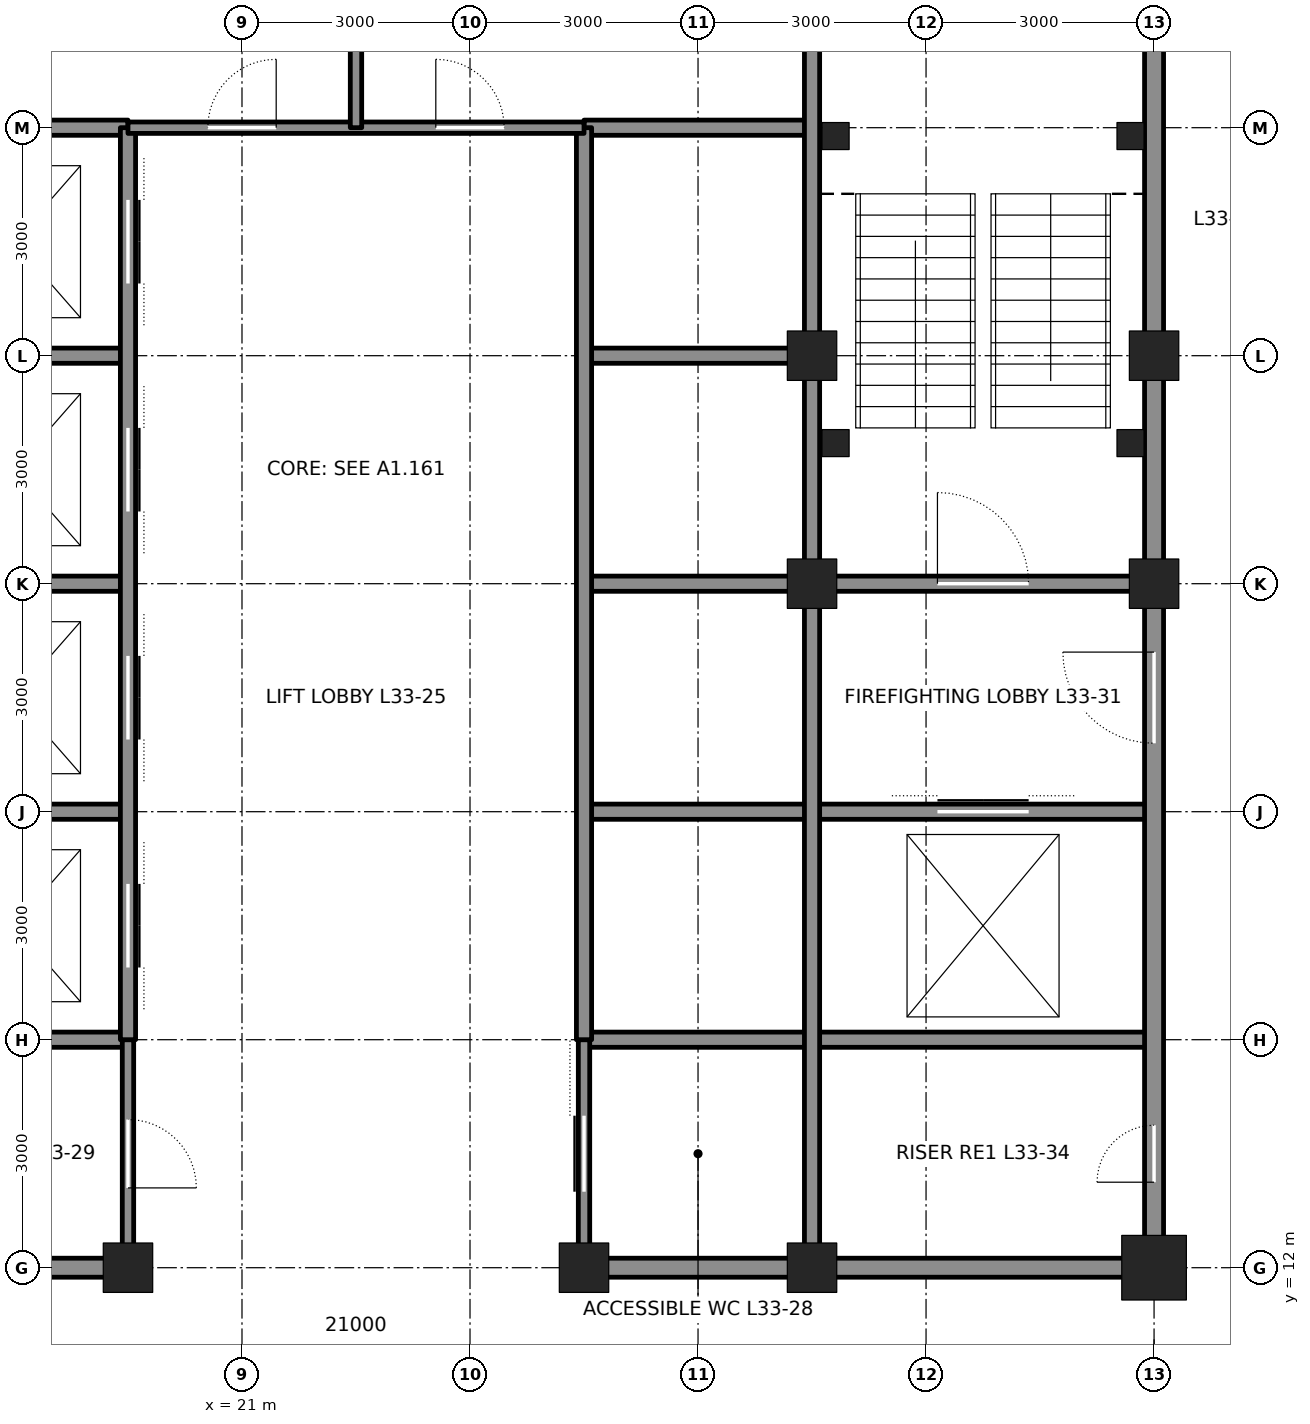
"""IFC4 building model, lengths in metres.
Left out: names, types, materials, properties, quantities, classifications, styles, units other than length and angle.
Written with IfcOpenShell. Run it as: python <this file> out.ifc"""

import sys

from ifc_helpers import new_model, si_unit, direction, frame, frame_2d, origin, origin_2d, place, context, subcontext, project, spatial, rectangle, hollow_rectangle, extrude, element, fill, save


model = new_model("IFC4")
c1 = context("Model", 3, precision=1e-05, world=origin(), true_north=direction((0.0, 1.0)))
c2 = subcontext(c1, "Body", "Model", "MODEL_VIEW")
j1 = project(units=[si_unit("LENGTHUNIT", "METRE"), si_unit("PLANEANGLEUNIT", "RADIAN")], contexts=[c1])
p1 = place(None, origin())
s1 = spatial("IfcSite", under=j1, at=p1, CompositionType="ELEMENT")
p2 = place(p1, origin())
s2 = spatial("IfcBuilding", under=s1, at=p2, CompositionType="ELEMENT")
p3 = place(p2, frame((0.0, 0.0, 153.0)))
s3 = spatial("IfcBuildingStorey", under=s2, at=p3, CompositionType="ELEMENT", Elevation=153.0)
for number, where, z_axis, x_axis in (
    (1, (19.5, 12.0, 0.0), (0.0, 0.0, 1.0), (1.0, 0.0, 0.0)),
    (2, (25.5, 12.0, 0.0), (0.0, 0.0, 1.0), (1.0, 0.0, 0.0)),
    (3, (28.5, 12.0, 0.0), (0.0, 0.0, 1.0), (1.0, 0.0, 0.0)),
):
    element("IfcColumn", number, at=place(p3, frame(where, z_axis=z_axis, x_axis=x_axis)), inside=s3, PredefinedType="COLUMN", context=c2, shape_type="SweptSolid", body=[
        extrude(hollow_rectangle(XDim=0.65, YDim=0.65, WallThickness=0.065, at=origin_2d()), origin(), (0.0, 0.0, 1.0), 4.2),
    ])
p4 = place(p3, frame((33.0, 12.0, 0.0), z_axis=(0.0, 0.0, 1.0), x_axis=(1.0, 0.0, 0.0)))
e4 = element("IfcColumn", 4, at=p4, inside=s3, PredefinedType="COLUMN", context=c2, shape_type="SweptSolid", body=[
    extrude(hollow_rectangle(XDim=0.85, YDim=0.85, WallThickness=0.085, at=origin_2d()), origin(), (0.0, 0.0, 1.0), 4.2),
])
for number, where, z_axis, x_axis in (
    (5, (33.0, 21.0, 0.0), (0.0, 0.0, 1.0), (1.0, 0.0, 0.0)),
    (6, (33.0, 24.0, 0.0), (0.0, 0.0, 1.0), (1.0, 0.0, 0.0)),
    (7, (28.5, 21.0, 0.0), (0.0, 0.0, 1.0), (1.0, 0.0, 0.0)),
    (8, (28.5, 24.0, 0.0), (0.0, 0.0, 1.0), (1.0, 0.0, 0.0)),
):
    element("IfcColumn", number, at=place(p3, frame(where, z_axis=z_axis, x_axis=x_axis)), inside=s3, PredefinedType="COLUMN", context=c2, shape_type="SweptSolid", body=[
        extrude(hollow_rectangle(XDim=0.65, YDim=0.65, WallThickness=0.065, at=origin_2d()), origin(), (0.0, 0.0, 1.0), 4.2),
    ])
for number, where, z_axis, x_axis in (
    (9, (16.75, 12.0, 0.0), (0.0, 0.0, 1.0), (1.0, 0.0, 0.0)),
    (10, (25.75, 12.0, 0.0), (0.0, 0.0, 1.0), (1.0, 0.0, 0.0)),
):
    element("IfcWall", number, at=place(p3, frame(where, z_axis=z_axis, x_axis=x_axis)), inside=s3, PredefinedType="SOLIDWALL", context=c2, shape_type="SweptSolid", body=[
        extrude(rectangle(XDim=2.5, YDim=0.25, at=frame_2d((1.25, 0.0))), origin(), (0.0, 0.0, 1.0), 3.181),
    ])
p5 = place(p3, frame((28.75, 12.0, 0.0), z_axis=(0.0, 0.0, 1.0), x_axis=(1.0, 0.0, 0.0)))
e11 = element("IfcWall", 11, at=p5, inside=s3, PredefinedType="SOLIDWALL", context=c2, shape_type="SweptSolid", body=[
    extrude(rectangle(XDim=4.0, YDim=0.25, at=frame_2d((2.0, 0.0))), origin(), (0.0, 0.0, 1.0), 3.181),
])
for number, where, z_axis, x_axis in (
    (12, (12.0, 15.0, 0.0), (0.0, 0.0, 1.0), (1.0, 0.0, 0.0)),
    (13, (25.5, 15.0, 0.0), (0.0, 0.0, 1.0), (1.0, 0.0, 0.0)),
):
    element("IfcWall", number, at=place(p3, frame(where, z_axis=z_axis, x_axis=x_axis)), inside=s3, PredefinedType="SOLIDWALL", context=c2, shape_type="SweptSolid", body=[
        extrude(rectangle(XDim=7.5, YDim=0.2, at=frame_2d((3.75, 0.0))), origin(), (0.0, 0.0, 1.0), 4.04),
    ])
for number, where, z_axis, x_axis in (
    (14, (16.75, 24.0, 0.0), (0.0, 0.0, 1.0), (1.0, 0.0, 0.0)),
    (15, (25.5, 24.0, 0.0), (0.0, 0.0, 1.0), (1.0, 0.0, 0.0)),
):
    element("IfcWall", number, at=place(p3, frame(where, z_axis=z_axis, x_axis=x_axis)), inside=s3, PredefinedType="SOLIDWALL", context=c2, shape_type="SweptSolid", body=[
        extrude(rectangle(XDim=2.75, YDim=0.2, at=frame_2d((1.375, 0.0))), origin(), (0.0, 0.0, 1.0), 3.09),
    ])
p6 = place(p3, frame((12.0, 27.0, 0.0), z_axis=(0.0, 0.0, 1.0), x_axis=(1.0, 0.0, 0.0)))
e16 = element("IfcWall", 16, at=p6, inside=s3, PredefinedType="SOLIDWALL", context=c2, shape_type="SweptSolid", body=[
    extrude(rectangle(XDim=7.5, YDim=0.2, at=frame_2d((3.75, 0.0))), origin(), (0.0, 0.0, 1.0), 4.04),
])
p7 = place(p6, frame((1.65, 0.0, 0.0)))
e17 = element("IfcOpeningElement", 17, at=p7, cuts=e16, PredefinedType="OPENING", context=c2, shape_type="SweptSolid", body=[
    extrude(rectangle(XDim=1.2, YDim=2.1, at=frame_2d((0.6, 1.05))), frame((0.0, 0.11, 0.0), z_axis=(0.0, -1.0, 0.0), x_axis=(1.0, 0.0, 0.0)), (0.0, 0.0, 1.0), 0.22),
])
for number, where, z_axis, x_axis in (
    (18, (25.5, 27.0, 0.0), (0.0, 0.0, 1.0), (1.0, 0.0, 0.0)),
    (19, (16.5, 18.0, 0.0), (0.0, 0.0, 1.0), (1.0, 0.0, 0.0)),
):
    element("IfcWall", number, at=place(p3, frame(where, z_axis=z_axis, x_axis=x_axis)), inside=s3, PredefinedType="SOLIDWALL", context=c2, shape_type="SweptSolid", body=[
        extrude(rectangle(XDim=3.0, YDim=0.2, at=frame_2d((1.5, 0.0))), origin(), (0.0, 0.0, 1.0), 4.04),
    ])
p8 = place(p3, frame((25.5, 18.0, 0.0), z_axis=(0.0, 0.0, 1.0), x_axis=(1.0, 0.0, 0.0)))
e20 = element("IfcWall", 20, at=p8, inside=s3, PredefinedType="SOLIDWALL", context=c2, shape_type="SweptSolid", body=[
    extrude(rectangle(XDim=7.5, YDim=0.2, at=frame_2d((3.75, 0.0))), origin(), (0.0, 0.0, 1.0), 4.04),
])
p9 = place(p8, frame((4.65, 0.0, 0.0)))
e21 = element("IfcOpeningElement", 21, at=p9, cuts=e20, PredefinedType="OPENING", context=c2, shape_type="SweptSolid", body=[
    extrude(rectangle(XDim=1.2, YDim=2.1, at=frame_2d((0.6, 1.05))), frame((0.0, 0.11, 0.0), z_axis=(0.0, -1.0, 0.0), x_axis=(1.0, 0.0, 0.0)), (0.0, 0.0, 1.0), 0.22),
])
for number, where, z_axis, x_axis in (
    (22, (16.75, 21.0, 0.0), (0.0, 0.0, 1.0), (1.0, 0.0, 0.0)),
    (23, (25.5, 21.0, 0.0), (0.0, 0.0, 1.0), (1.0, 0.0, 0.0)),
):
    element("IfcWall", number, at=place(p3, frame(where, z_axis=z_axis, x_axis=x_axis)), inside=s3, PredefinedType="SOLIDWALL", context=c2, shape_type="SweptSolid", body=[
        extrude(rectangle(XDim=2.75, YDim=0.2, at=frame_2d((1.375, 0.0))), origin(), (0.0, 0.0, 1.0), 3.09),
    ])
p10 = place(p3, frame((28.75, 21.0, 0.0), z_axis=(0.0, 0.0, 1.0), x_axis=(1.0, 0.0, 0.0)))
e24 = element("IfcWall", 24, at=p10, inside=s3, PredefinedType="SOLIDWALL", context=c2, shape_type="SweptSolid", body=[
    extrude(rectangle(XDim=4.0, YDim=0.2, at=frame_2d((2.0, 0.0))), origin(), (0.0, 0.0, 1.0), 3.09),
])
p11 = place(p10, frame((1.4, 0.0, 0.0)))
e25 = element("IfcOpeningElement", 25, at=p11, cuts=e24, PredefinedType="OPENING", context=c2, shape_type="SweptSolid", body=[
    extrude(rectangle(XDim=1.2, YDim=2.1, at=frame_2d((0.6, 1.05))), frame((0.0, 0.11, 0.0), z_axis=(0.0, -1.0, 0.0), x_axis=(1.0, 0.0, 0.0)), (0.0, 0.0, 1.0), 0.22),
])
p12 = place(p3, frame((19.5, 12.25, 0.0), z_axis=(0.0, 0.0, 1.0), x_axis=(0.0, 1.0, 0.0)))
e26 = element("IfcWall", 26, at=p12, inside=s3, PredefinedType="PARTITIONING", context=c2, shape_type="SweptSolid", body=[
    extrude(rectangle(XDim=2.75, YDim=0.15, at=frame_2d((1.375, 0.0))), origin(), (0.0, 0.0, 1.0), 3.065),
])
p13 = place(p12, frame((0.8, 0.0, 0.0)))
e27 = element("IfcOpeningElement", 27, at=p13, cuts=e26, PredefinedType="OPENING", context=c2, shape_type="SweptSolid", body=[
    extrude(rectangle(XDim=0.9, YDim=2.1, at=frame_2d((0.45, 1.05))), frame((0.0, 0.085, 0.0), z_axis=(0.0, -1.0, 0.0), x_axis=(1.0, 0.0, 0.0)), (0.0, 0.0, 1.0), 0.17),
])
p14 = place(p3, frame((19.5, 15.0, 0.0), z_axis=(0.0, 0.0, 1.0), x_axis=(0.0, 1.0, 0.0)))
e28 = element("IfcWall", 28, at=p14, inside=s3, PredefinedType="SOLIDWALL", context=c2, shape_type="SweptSolid", body=[
    extrude(rectangle(XDim=12.0, YDim=0.2, at=frame_2d((6.0, 0.0))), origin(), (0.0, 0.0, 1.0), 3.065),
])
p15 = place(p14, frame((0.95, 0.0, 0.0)))
e29 = element("IfcOpeningElement", 29, at=p15, cuts=e28, PredefinedType="OPENING", context=c2, shape_type="SweptSolid", body=[
    extrude(rectangle(XDim=1.1, YDim=2.1, at=frame_2d((0.55, 1.05))), frame((0.0, 0.11, 0.0), z_axis=(0.0, -1.0, 0.0), x_axis=(1.0, 0.0, 0.0)), (0.0, 0.0, 1.0), 0.22),
])
p16 = place(p14, frame((3.95, 0.0, 0.0)))
e30 = element("IfcOpeningElement", 30, at=p16, cuts=e28, PredefinedType="OPENING", context=c2, shape_type="SweptSolid", body=[
    extrude(rectangle(XDim=1.1, YDim=2.1, at=frame_2d((0.55, 1.05))), frame((0.0, 0.11, 0.0), z_axis=(0.0, -1.0, 0.0), x_axis=(1.0, 0.0, 0.0)), (0.0, 0.0, 1.0), 0.22),
])
p17 = place(p14, frame((6.95, 0.0, 0.0)))
e31 = element("IfcOpeningElement", 31, at=p17, cuts=e28, PredefinedType="OPENING", context=c2, shape_type="SweptSolid", body=[
    extrude(rectangle(XDim=1.1, YDim=2.1, at=frame_2d((0.55, 1.05))), frame((0.0, 0.11, 0.0), z_axis=(0.0, -1.0, 0.0), x_axis=(1.0, 0.0, 0.0)), (0.0, 0.0, 1.0), 0.22),
])
p18 = place(p14, frame((9.95, 0.0, 0.0)))
e32 = element("IfcOpeningElement", 32, at=p18, cuts=e28, PredefinedType="OPENING", context=c2, shape_type="SweptSolid", body=[
    extrude(rectangle(XDim=1.1, YDim=2.1, at=frame_2d((0.55, 1.05))), frame((0.0, 0.11, 0.0), z_axis=(0.0, -1.0, 0.0), x_axis=(1.0, 0.0, 0.0)), (0.0, 0.0, 1.0), 0.22),
])
p19 = place(p3, frame((25.5, 12.25, 0.0), z_axis=(0.0, 0.0, 1.0), x_axis=(0.0, 1.0, 0.0)))
e33 = element("IfcWall", 33, at=p19, inside=s3, PredefinedType="PARTITIONING", context=c2, shape_type="SweptSolid", body=[
    extrude(rectangle(XDim=2.75, YDim=0.15, at=frame_2d((1.375, 0.0))), origin(), (0.0, 0.0, 1.0), 3.065),
])
p20 = place(p19, frame((0.75, 0.0, 0.0)))
e34 = element("IfcOpeningElement", 34, at=p20, cuts=e33, PredefinedType="OPENING", context=c2, shape_type="SweptSolid", body=[
    extrude(rectangle(XDim=1.0, YDim=2.1, at=frame_2d((0.5, 1.05))), frame((0.0, 0.085, 0.0), z_axis=(0.0, -1.0, 0.0), x_axis=(1.0, 0.0, 0.0)), (0.0, 0.0, 1.0), 0.17),
])
p21 = place(p3, frame((25.5, 15.0, 0.0), z_axis=(0.0, 0.0, 1.0), x_axis=(0.0, 1.0, 0.0)))
e35 = element("IfcWall", 35, at=p21, inside=s3, PredefinedType="SOLIDWALL", context=c2, shape_type="SweptSolid", body=[
    extrude(rectangle(XDim=12.0, YDim=0.2, at=frame_2d((6.0, 0.0))), origin(), (0.0, 0.0, 1.0), 3.065),
])
p22 = place(p3, frame((28.5, 12.25, 0.0), z_axis=(0.0, 0.0, 1.0), x_axis=(0.0, 1.0, 0.0)))
e36 = element("IfcWall", 36, at=p22, inside=s3, PredefinedType="SOLIDWALL", context=c2, shape_type="SweptSolid", body=[
    extrude(rectangle(XDim=8.5, YDim=0.2, at=frame_2d((4.25, 0.0))), origin(), (0.0, 0.0, 1.0), 3.113),
])
p23 = place(p3, frame((28.5, 21.25, 0.0), z_axis=(0.0, 0.0, 1.0), x_axis=(0.0, 1.0, 0.0)))
e37 = element("IfcWall", 37, at=p23, inside=s3, PredefinedType="SOLIDWALL", context=c2, shape_type="SweptSolid", body=[
    extrude(rectangle(XDim=2.5, YDim=0.2, at=frame_2d((1.25, 0.0))), origin(), (0.0, 0.0, 1.0), 3.113),
])
p24 = place(p3, frame((28.5, 24.25, 0.0), z_axis=(0.0, 0.0, 1.0), x_axis=(0.0, 1.0, 0.0)))
e38 = element("IfcWall", 38, at=p24, inside=s3, PredefinedType="SOLIDWALL", context=c2, shape_type="SweptSolid", body=[
    extrude(rectangle(XDim=8.5, YDim=0.2, at=frame_2d((4.25, 0.0))), origin(), (0.0, 0.0, 1.0), 3.113),
])
p25 = place(p3, frame((33.0, 12.25, 0.0), z_axis=(0.0, 0.0, 1.0), x_axis=(0.0, 1.0, 0.0)))
e39 = element("IfcWall", 39, at=p25, inside=s3, PredefinedType="SOLIDWALL", context=c2, shape_type="SweptSolid", body=[
    extrude(rectangle(XDim=8.5, YDim=0.25, at=frame_2d((4.25, 0.0))), origin(), (0.0, 0.0, 1.0), 3.113),
])
p26 = place(p25, frame((6.65, 0.0, 0.0)))
e40 = element("IfcOpeningElement", 40, at=p26, cuts=e39, PredefinedType="OPENING", context=c2, shape_type="SweptSolid", body=[
    extrude(rectangle(XDim=1.2, YDim=2.1, at=frame_2d((0.6, 1.05))), frame((0.0, 0.135, 0.0), z_axis=(0.0, -1.0, 0.0), x_axis=(1.0, 0.0, 0.0)), (0.0, 0.0, 1.0), 0.27),
])
p27 = place(p25, frame((0.875, 0.0, 0.0)))
e41 = element("IfcOpeningElement", 41, at=p27, cuts=e39, PredefinedType="OPENING", context=c2, shape_type="SweptSolid", body=[
    extrude(rectangle(XDim=0.75, YDim=2.1, at=frame_2d((0.375, 1.05))), frame((0.0, 0.135, 0.0), z_axis=(0.0, -1.0, 0.0), x_axis=(1.0, 0.0, 0.0)), (0.0, 0.0, 1.0), 0.27),
])
p28 = place(p3, frame((33.0, 21.25, 0.0), z_axis=(0.0, 0.0, 1.0), x_axis=(0.0, 1.0, 0.0)))
e42 = element("IfcWall", 42, at=p28, inside=s3, PredefinedType="SOLIDWALL", context=c2, shape_type="SweptSolid", body=[
    extrude(rectangle(XDim=2.5, YDim=0.25, at=frame_2d((1.25, 0.0))), origin(), (0.0, 0.0, 1.0), 3.113),
])
p29 = place(p3, frame((33.0, 24.25, 0.0), z_axis=(0.0, 0.0, 1.0), x_axis=(0.0, 1.0, 0.0)))
e43 = element("IfcWall", 43, at=p29, inside=s3, PredefinedType="SOLIDWALL", context=c2, shape_type="SweptSolid", body=[
    extrude(rectangle(XDim=8.5, YDim=0.25, at=frame_2d((4.25, 0.0))), origin(), (0.0, 0.0, 1.0), 3.113),
])
p30 = place(p29, frame((6.875, 0.0, 0.0)))
e44 = element("IfcOpeningElement", 44, at=p30, cuts=e43, PredefinedType="OPENING", context=c2, shape_type="SweptSolid", body=[
    extrude(rectangle(XDim=0.75, YDim=2.1, at=frame_2d((0.375, 1.05))), frame((0.0, 0.135, 0.0), z_axis=(0.0, -1.0, 0.0), x_axis=(1.0, 0.0, 0.0)), (0.0, 0.0, 1.0), 0.27),
])
p31 = place(p3, frame((19.5, 27.0, 0.0), z_axis=(0.0, 0.0, 1.0), x_axis=(1.0, 0.0, 0.0)))
e45 = element("IfcWall", 45, at=p31, inside=s3, PredefinedType="PARTITIONING", context=c2, shape_type="SweptSolid", body=[
    extrude(rectangle(XDim=6.0, YDim=0.15, at=frame_2d((3.0, 0.0))), origin(), (0.0, 0.0, 1.0), 4.04),
])
p32 = place(p31, frame((1.05, 0.0, 0.0)))
e46 = element("IfcOpeningElement", 46, at=p32, cuts=e45, PredefinedType="OPENING", context=c2, shape_type="SweptSolid", body=[
    extrude(rectangle(XDim=0.9, YDim=2.1, at=frame_2d((0.45, 1.05))), frame((0.0, 0.085, 0.0), z_axis=(0.0, -1.0, 0.0), x_axis=(1.0, 0.0, 0.0)), (0.0, 0.0, 1.0), 0.17),
])
p33 = place(p31, frame((4.05, 0.0, 0.0)))
e47 = element("IfcOpeningElement", 47, at=p33, cuts=e45, PredefinedType="OPENING", context=c2, shape_type="SweptSolid", body=[
    extrude(rectangle(XDim=0.9, YDim=2.1, at=frame_2d((0.45, 1.05))), frame((0.0, 0.085, 0.0), z_axis=(0.0, -1.0, 0.0), x_axis=(1.0, 0.0, 0.0)), (0.0, 0.0, 1.0), 0.17),
])
p34 = place(p3, frame((22.5, 27.0, 0.0), z_axis=(0.0, 0.0, 1.0), x_axis=(0.0, 1.0, 0.0)))
e48 = element("IfcWall", 48, at=p34, inside=s3, PredefinedType="PARTITIONING", context=c2, shape_type="SweptSolid", body=[
    extrude(rectangle(XDim=6.0, YDim=0.15, at=frame_2d((3.0, 0.0))), origin(), (0.0, 0.0, 1.0), 4.04),
])
for number, where, z_axis, x_axis in (
    (49, (28.81, 26.89, 0.0), (0.0, 0.0, 1.0), (1.0, 0.0, 0.0)),
    (50, (32.69, 26.89, 0.0), (0.0, 0.0, 1.0), (1.0, 0.0, 0.0)),
    (51, (28.81, 22.85, 0.0), (0.0, 0.0, 1.0), (1.0, 0.0, 0.0)),
    (52, (32.69, 22.85, 0.0), (0.0, 0.0, 1.0), (1.0, 0.0, 0.0)),
):
    element("IfcColumn", number, at=place(p3, frame(where, z_axis=z_axis, x_axis=x_axis)), inside=s3, PredefinedType="COLUMN", context=c2, shape_type="SweptSolid", body=[
        extrude(hollow_rectangle(XDim=0.356, YDim=0.356, WallThickness=0.015, at=origin_2d()), origin(), (0.0, 0.0, 1.0), 4.2),
    ])
p35 = place(p11, origin())
e53 = element("IfcDoor", 53, at=p35, inside=s3, OperationType="SINGLE_SWING_LEFT", PredefinedType="DOOR", context=c2, shape_type="SweptSolid", body=[
    extrude(rectangle(XDim=1.2, YDim=2.1, at=frame_2d((0.6, 1.05))), frame((0.0, 0.025, 0.0), z_axis=(0.0, -1.0, 0.0), x_axis=(1.0, 0.0, 0.0)), (0.0, 0.0, 1.0), 0.05),
])
fill(e25, e53)
p36 = place(p26, origin())
e54 = element("IfcDoor", 54, at=p36, inside=s3, OperationType="SINGLE_SWING_RIGHT", PredefinedType="DOOR", context=c2, shape_type="SweptSolid", body=[
    extrude(rectangle(XDim=1.2, YDim=2.1, at=frame_2d((0.6, 1.05))), frame((0.0, 0.025, 0.0), z_axis=(0.0, -1.0, 0.0), x_axis=(1.0, 0.0, 0.0)), (0.0, 0.0, 1.0), 0.05),
])
fill(e40, e54)
p37 = place(p9, origin())
e55 = element("IfcDoor", 55, at=p37, inside=s3, OperationType="DOUBLE_DOOR_SLIDING", PredefinedType="DOOR", context=c2, shape_type="SweptSolid", body=[
    extrude(rectangle(XDim=1.2, YDim=2.1, at=frame_2d((0.6, 1.05))), frame((0.0, 0.025, 0.0), z_axis=(0.0, -1.0, 0.0), x_axis=(1.0, 0.0, 0.0)), (0.0, 0.0, 1.0), 0.05),
])
fill(e21, e55)
p38 = place(p27, origin())
e56 = element("IfcDoor", 56, at=p38, inside=s3, OperationType="SINGLE_SWING_LEFT", PredefinedType="DOOR", context=c2, shape_type="SweptSolid", body=[
    extrude(rectangle(XDim=0.75, YDim=2.1, at=frame_2d((0.375, 1.05))), frame((0.0, 0.025, 0.0), z_axis=(0.0, -1.0, 0.0), x_axis=(1.0, 0.0, 0.0)), (0.0, 0.0, 1.0), 0.05),
])
fill(e41, e56)
p39 = place(p32, origin())
e57 = element("IfcDoor", 57, at=p39, inside=s3, OperationType="SINGLE_SWING_RIGHT", PredefinedType="DOOR", context=c2, shape_type="SweptSolid", body=[
    extrude(rectangle(XDim=0.9, YDim=2.1, at=frame_2d((0.45, 1.05))), frame((0.0, 0.025, 0.0), z_axis=(0.0, -1.0, 0.0), x_axis=(1.0, 0.0, 0.0)), (0.0, 0.0, 1.0), 0.05),
])
fill(e46, e57)
p40 = place(p33, origin())
e58 = element("IfcDoor", 58, at=p40, inside=s3, OperationType="SINGLE_SWING_LEFT", PredefinedType="DOOR", context=c2, shape_type="SweptSolid", body=[
    extrude(rectangle(XDim=0.9, YDim=2.1, at=frame_2d((0.45, 1.05))), frame((0.0, 0.025, 0.0), z_axis=(0.0, -1.0, 0.0), x_axis=(1.0, 0.0, 0.0)), (0.0, 0.0, 1.0), 0.05),
])
fill(e47, e58)
p41 = place(p20, origin())
e59 = element("IfcDoor", 59, at=p41, inside=s3, OperationType="SLIDING_TO_LEFT", PredefinedType="DOOR", context=c2, shape_type="SweptSolid", body=[
    extrude(rectangle(XDim=1.0, YDim=2.1, at=frame_2d((0.5, 1.05))), frame((0.0, 0.025, 0.0), z_axis=(0.0, -1.0, 0.0), x_axis=(1.0, 0.0, 0.0)), (0.0, 0.0, 1.0), 0.05),
])
fill(e34, e59)
p42 = place(p13, frame((0.9, 0.0, 0.0), z_axis=(0.0, 0.0, 1.0), x_axis=(-1.0, 0.0, 0.0)))
e60 = element("IfcDoor", 60, at=p42, inside=s3, OperationType="SINGLE_SWING_RIGHT", PredefinedType="DOOR", context=c2, shape_type="SweptSolid", body=[
    extrude(rectangle(XDim=0.9, YDim=2.1, at=frame_2d((0.45, 1.05))), frame((0.0, 0.025, 0.0), z_axis=(0.0, -1.0, 0.0), x_axis=(1.0, 0.0, 0.0)), (0.0, 0.0, 1.0), 0.05),
])
fill(e27, e60)
p43 = place(p15, origin())
e61 = element("IfcDoor", 61, at=p43, inside=s3, OperationType="DOUBLE_DOOR_SLIDING", PredefinedType="DOOR", context=c2, shape_type="SweptSolid", body=[
    extrude(rectangle(XDim=1.1, YDim=2.1, at=frame_2d((0.55, 1.05))), frame((0.0, 0.025, 0.0), z_axis=(0.0, -1.0, 0.0), x_axis=(1.0, 0.0, 0.0)), (0.0, 0.0, 1.0), 0.05),
])
fill(e29, e61)
p44 = place(p16, origin())
e62 = element("IfcDoor", 62, at=p44, inside=s3, OperationType="DOUBLE_DOOR_SLIDING", PredefinedType="DOOR", context=c2, shape_type="SweptSolid", body=[
    extrude(rectangle(XDim=1.1, YDim=2.1, at=frame_2d((0.55, 1.05))), frame((0.0, 0.025, 0.0), z_axis=(0.0, -1.0, 0.0), x_axis=(1.0, 0.0, 0.0)), (0.0, 0.0, 1.0), 0.05),
])
fill(e30, e62)
p45 = place(p17, origin())
e63 = element("IfcDoor", 63, at=p45, inside=s3, OperationType="DOUBLE_DOOR_SLIDING", PredefinedType="DOOR", context=c2, shape_type="SweptSolid", body=[
    extrude(rectangle(XDim=1.1, YDim=2.1, at=frame_2d((0.55, 1.05))), frame((0.0, 0.025, 0.0), z_axis=(0.0, -1.0, 0.0), x_axis=(1.0, 0.0, 0.0)), (0.0, 0.0, 1.0), 0.05),
])
fill(e31, e63)
p46 = place(p18, origin())
e64 = element("IfcDoor", 64, at=p46, inside=s3, OperationType="DOUBLE_DOOR_SLIDING", PredefinedType="DOOR", context=c2, shape_type="SweptSolid", body=[
    extrude(rectangle(XDim=1.1, YDim=2.1, at=frame_2d((0.55, 1.05))), frame((0.0, 0.025, 0.0), z_axis=(0.0, -1.0, 0.0), x_axis=(1.0, 0.0, 0.0)), (0.0, 0.0, 1.0), 0.05),
])
fill(e32, e64)
save(model, sys.argv[1])
